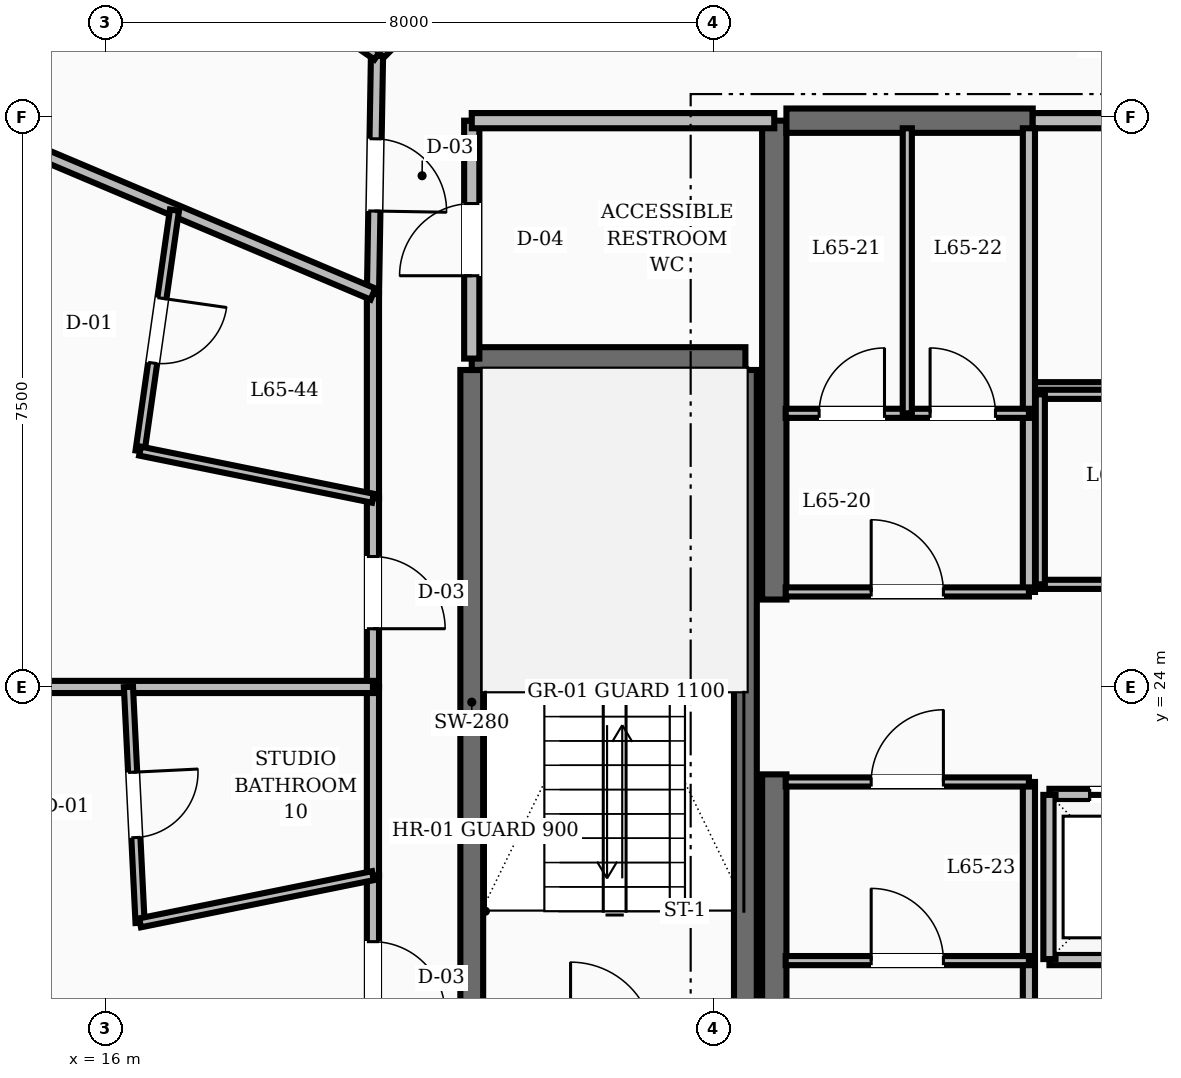
"""IFC4 building model, lengths in metres.
Left out: names, types, materials, properties, quantities, classifications, styles, units other than length and angle.
Written with IfcOpenShell. Run it as: python <this file> out.ifc"""

import sys

from ifc_helpers import new_model, si_unit, direction, frame, frame_2d, origin, place, context, subcontext, project, spatial, rectangle, extrude, element, fill, save


model = new_model("IFC4")
c1 = context("Model", 3, precision=1e-05, world=origin(), true_north=direction((0.0, 1.0)))
c2 = subcontext(c1, "Body", "Model", "MODEL_VIEW")
j1 = project(units=[si_unit("LENGTHUNIT", "METRE"), si_unit("PLANEANGLEUNIT", "RADIAN")], contexts=[c1])
p1 = place(None, origin())
s1 = spatial("IfcSite", under=j1, at=p1, CompositionType="ELEMENT")
p2 = place(p1, origin())
s2 = spatial("IfcBuilding", under=s1, at=p2, CompositionType="ELEMENT")
p3 = place(p2, frame((0.0, 0.0, 250.8)))
s3 = spatial("IfcBuildingStorey", under=s2, at=p3, CompositionType="ELEMENT", Elevation=250.8)
for number, where, z_axis, x_axis in (
    (1, (24.8, 16.55, 0.0), (0.0, 0.0, 1.0), (0.0, 1.0, 0.0)),
    (2, (24.8, 25.15, 0.0), (0.0, 0.0, 1.0), (0.0, 1.0, 0.0)),
):
    element("IfcWall", number, at=place(p3, frame(where, z_axis=z_axis, x_axis=x_axis)), inside=s3, PredefinedType="SHEAR", context=c2, shape_type="SweptSolid", body=[
        extrude(rectangle(XDim=6.3, YDim=0.32, at=frame_2d((3.15, 0.0))), origin(), (0.0, 0.0, 1.0), 3.6),
    ])
p4 = place(p3, frame((24.96, 31.45, 0.0), z_axis=(0.0, 0.0, 1.0), x_axis=(1.0, 0.0, 0.0)))
e3 = element("IfcWall", 3, at=p4, inside=s3, PredefinedType="SHEAR", context=c2, shape_type="SweptSolid", body=[
    extrude(rectangle(XDim=3.24, YDim=0.32, at=frame_2d((1.62, 0.0))), origin(), (0.0, 0.0, 1.0), 3.6),
])
for number, where, z_axis, x_axis in (
    (4, (20.82, 19.43, 0.0), (0.0, 0.0, 1.0), (0.0, 1.0, 0.0)),
    (5, (24.42, 19.43, 0.0), (0.0, 0.0, 1.0), (0.0, 1.0, 0.0)),
):
    element("IfcWall", number, at=place(p3, frame(where, z_axis=z_axis, x_axis=x_axis)), inside=s3, PredefinedType="SHEAR", context=c2, shape_type="SweptSolid", body=[
        extrude(rectangle(XDim=8.74, YDim=0.3, at=frame_2d((4.37, 0.0))), origin(), (0.0, 0.0, 1.0), 3.6),
    ])
p5 = place(p3, frame((20.82, 28.32, 0.0), z_axis=(0.0, 0.0, 1.0), x_axis=(1.0, 0.0, 0.0)))
e6 = element("IfcWall", 6, at=p5, inside=s3, PredefinedType="SHEAR", context=c2, shape_type="SweptSolid", body=[
    extrude(rectangle(XDim=3.6, YDim=0.3, at=frame_2d((1.8, 0.0))), origin(), (0.0, 0.0, 1.0), 3.6),
])
p6 = place(p3, frame((20.82, 28.32, 0.0), z_axis=(0.0, 0.0, 1.0), x_axis=(0.0, 1.0, 0.0)))
e7 = element("IfcWall", 7, at=p6, inside=s3, PredefinedType="SOLIDWALL", context=c2, shape_type="SweptSolid", body=[
    extrude(rectangle(XDim=3.13, YDim=0.2, at=frame_2d((1.565, 0.0))), origin(), (0.0, 0.0, 1.0), 2.87),
])
p7 = place(p6, frame((1.09, 0.0, 0.0)))
e8 = element("IfcOpeningElement", 8, at=p7, cuts=e7, PredefinedType="OPENING", context=c2, shape_type="SweptSolid", body=[
    extrude(rectangle(XDim=0.95, YDim=2.1, at=frame_2d((0.475, 1.05))), frame((0.0, 0.11, 0.0), z_axis=(0.0, -1.0, 0.0), x_axis=(1.0, 0.0, 0.0)), (0.0, 0.0, 1.0), 0.22),
])
p8 = place(p3, frame((20.82, 31.45, 0.0), z_axis=(0.0, 0.0, 1.0), x_axis=(1.0, 0.0, 0.0)))
e9 = element("IfcWall", 9, at=p8, inside=s3, PredefinedType="SOLIDWALL", context=c2, shape_type="SweptSolid", body=[
    extrude(rectangle(XDim=3.98, YDim=0.2, at=frame_2d((1.99, 0.0))), origin(), (0.0, 0.0, 1.0), 2.87),
])
p9 = place(p3, frame((28.42, 22.58, 0.0), z_axis=(0.0, 0.0, 1.0), x_axis=(1.0, 0.0, 0.0)))
e10 = element("IfcWall", 10, at=p9, inside=s3, PredefinedType="SOLIDWALL", context=c2, shape_type="SweptSolid", body=[
    extrude(rectangle(XDim=2.16, YDim=0.16, at=frame_2d((1.08, 0.0))), origin(), (0.0, 0.0, 1.0), 2.87),
])
p10 = place(p9, frame((0.53, 0.0, 0.0)))
e11 = element("IfcOpeningElement", 11, at=p10, cuts=e10, PredefinedType="OPENING", context=c2, shape_type="SweptSolid", body=[
    extrude(rectangle(XDim=1.1, YDim=2.15, at=frame_2d((0.55, 1.075))), frame((0.0, 0.09, 0.0), z_axis=(0.0, -1.0, 0.0), x_axis=(1.0, 0.0, 0.0)), (0.0, 0.0, 1.0), 0.18),
])
for number, where, z_axis, x_axis in (
    (12, (28.42, 20.42, 0.0), (0.0, 0.0, 1.0), (1.0, 0.0, 0.0)),
    (13, (28.42, 20.42, 0.0), (0.0, 0.0, 1.0), (0.0, 1.0, 0.0)),
):
    element("IfcWall", number, at=place(p3, frame(where, z_axis=z_axis, x_axis=x_axis)), inside=s3, PredefinedType="SOLIDWALL", context=c2, shape_type="SweptSolid", body=[
        extrude(rectangle(XDim=2.16, YDim=0.16, at=frame_2d((1.08, 0.0))), origin(), (0.0, 0.0, 1.0), 2.87),
    ])
p11 = place(p3, frame((28.2, 31.45, 0.0), z_axis=(0.0, 0.0, 1.0), x_axis=(1.0, 0.0, 0.0)))
e14 = element("IfcWall", 14, at=p11, inside=s3, PredefinedType="SOLIDWALL", context=c2, shape_type="SweptSolid", body=[
    extrude(rectangle(XDim=7.6, YDim=0.2, at=frame_2d((3.8, 0.0))), origin(), (0.0, 0.0, 1.0), 2.87),
])
p12 = place(p11, frame((1.0, 0.0, 0.0)))
e15 = element("IfcOpeningElement", 15, at=p12, cuts=e14, PredefinedType="OPENING", context=c2, shape_type="SweptSolid", body=[
    extrude(rectangle(XDim=0.95, YDim=2.1, at=frame_2d((0.475, 1.05))), frame((0.0, 0.11, 0.0), z_axis=(0.0, -1.0, 0.0), x_axis=(1.0, 0.0, 0.0)), (0.0, 0.0, 1.0), 0.22),
])
p13 = place(p3, frame((28.2, 27.95, 0.0), z_axis=(0.0, 0.0, 1.0), x_axis=(1.0, 0.0, 0.0)))
e16 = element("IfcWall", 16, at=p13, inside=s3, PredefinedType="PARTITIONING", context=c2, shape_type="SweptSolid", body=[
    extrude(rectangle(XDim=7.6, YDim=0.12, at=frame_2d((3.8, 0.0))), origin(), (0.0, 0.0, 1.0), 2.87),
])
p14 = place(p3, frame((28.3, 25.35, 0.0), z_axis=(0.0, 0.0, 1.0), x_axis=(1.0, 0.0, 0.0)))
e17 = element("IfcWall", 17, at=p14, inside=s3, PredefinedType="PARTITIONING", context=c2, shape_type="SweptSolid", body=[
    extrude(rectangle(XDim=4.95, YDim=0.12, at=frame_2d((2.475, 0.0))), origin(), (0.0, 0.0, 1.0), 2.87),
])
p15 = place(p14, frame((2.0, 0.0, 0.0)))
e18 = element("IfcOpeningElement", 18, at=p15, cuts=e17, PredefinedType="OPENING", context=c2, shape_type="SweptSolid", body=[
    extrude(rectangle(XDim=0.95, YDim=2.1, at=frame_2d((0.475, 1.05))), frame((0.0, 0.07, 0.0), z_axis=(0.0, -1.0, 0.0), x_axis=(1.0, 0.0, 0.0)), (0.0, 0.0, 1.0), 0.14),
])
p16 = place(p3, frame((28.3, 27.85, 0.0), z_axis=(0.0, 0.0, 1.0), x_axis=(1.0, 0.0, 0.0)))
e19 = element("IfcWall", 19, at=p16, inside=s3, PredefinedType="PARTITIONING", context=c2, shape_type="SweptSolid", body=[
    extrude(rectangle(XDim=4.95, YDim=0.12, at=frame_2d((2.475, 0.0))), origin(), (0.0, 0.0, 1.0), 2.87),
])
p17 = place(p3, frame((28.3, 25.35, 0.0), z_axis=(0.0, 0.0, 1.0), x_axis=(0.0, 1.0, 0.0)))
e20 = element("IfcWall", 20, at=p17, inside=s3, PredefinedType="PARTITIONING", context=c2, shape_type="SweptSolid", body=[
    extrude(rectangle(XDim=2.5, YDim=0.12, at=frame_2d((1.25, 0.0))), origin(), (0.0, 0.0, 1.0), 2.87),
])
p18 = place(p3, frame((28.15, 16.7, 0.0), z_axis=(0.0, 0.0, 1.0), x_axis=(0.0, 1.0, 0.0)))
e21 = element("IfcWall", 21, at=p18, inside=s3, PredefinedType="SOLIDWALL", context=c2, shape_type="SweptSolid", body=[
    extrude(rectangle(XDim=6.05, YDim=0.16, at=frame_2d((3.025, 0.0))), origin(), (0.0, 0.0, 1.0), 2.87),
])
p19 = place(p3, frame((28.15, 25.25, 0.0), z_axis=(0.0, 0.0, 1.0), x_axis=(0.0, 1.0, 0.0)))
e22 = element("IfcWall", 22, at=p19, inside=s3, PredefinedType="SOLIDWALL", context=c2, shape_type="SweptSolid", body=[
    extrude(rectangle(XDim=6.1, YDim=0.16, at=frame_2d((3.05, 0.0))), origin(), (0.0, 0.0, 1.0), 2.87),
])
p20 = place(p3, frame((24.95, 25.25, 0.0), z_axis=(0.0, 0.0, 1.0), x_axis=(1.0, 0.0, 0.0)))
e23 = element("IfcWall", 23, at=p20, inside=s3, PredefinedType="PARTITIONING", context=c2, shape_type="SweptSolid", body=[
    extrude(rectangle(XDim=3.2, YDim=0.12, at=frame_2d((1.6, 0.0))), origin(), (0.0, 0.0, 1.0), 2.87),
])
p21 = place(p20, frame((1.125, 0.0, 0.0)))
e24 = element("IfcOpeningElement", 24, at=p21, cuts=e23, PredefinedType="OPENING", context=c2, shape_type="SweptSolid", body=[
    extrude(rectangle(XDim=0.95, YDim=2.1, at=frame_2d((0.475, 1.05))), frame((0.0, 0.07, 0.0), z_axis=(0.0, -1.0, 0.0), x_axis=(1.0, 0.0, 0.0)), (0.0, 0.0, 1.0), 0.14),
])
p22 = place(p3, frame((24.95, 22.75, 0.0), z_axis=(0.0, 0.0, 1.0), x_axis=(1.0, 0.0, 0.0)))
e25 = element("IfcWall", 25, at=p22, inside=s3, PredefinedType="PARTITIONING", context=c2, shape_type="SweptSolid", body=[
    extrude(rectangle(XDim=3.2, YDim=0.12, at=frame_2d((1.6, 0.0))), origin(), (0.0, 0.0, 1.0), 2.87),
])
p23 = place(p22, frame((1.125, 0.0, 0.0)))
e26 = element("IfcOpeningElement", 26, at=p23, cuts=e25, PredefinedType="OPENING", context=c2, shape_type="SweptSolid", body=[
    extrude(rectangle(XDim=0.95, YDim=2.1, at=frame_2d((0.475, 1.05))), frame((0.0, 0.07, 0.0), z_axis=(0.0, -1.0, 0.0), x_axis=(1.0, 0.0, 0.0)), (0.0, 0.0, 1.0), 0.14),
])
p24 = place(p3, frame((24.95, 27.6, 0.0), z_axis=(0.0, 0.0, 1.0), x_axis=(1.0, 0.0, 0.0)))
e27 = element("IfcWall", 27, at=p24, inside=s3, PredefinedType="PARTITIONING", context=c2, shape_type="SweptSolid", body=[
    extrude(rectangle(XDim=3.2, YDim=0.12, at=frame_2d((1.6, 0.0))), origin(), (0.0, 0.0, 1.0), 2.87),
])
p25 = place(p24, frame((0.44, 0.0, 0.0)))
e28 = element("IfcOpeningElement", 28, at=p25, cuts=e27, PredefinedType="OPENING", context=c2, shape_type="SweptSolid", body=[
    extrude(rectangle(XDim=0.86, YDim=2.1, at=frame_2d((0.43, 1.05))), frame((0.0, 0.07, 0.0), z_axis=(0.0, -1.0, 0.0), x_axis=(1.0, 0.0, 0.0)), (0.0, 0.0, 1.0), 0.14),
])
p26 = place(p24, frame((1.9, 0.0, 0.0)))
e29 = element("IfcOpeningElement", 29, at=p26, cuts=e27, PredefinedType="OPENING", context=c2, shape_type="SweptSolid", body=[
    extrude(rectangle(XDim=0.86, YDim=2.1, at=frame_2d((0.43, 1.05))), frame((0.0, 0.07, 0.0), z_axis=(0.0, -1.0, 0.0), x_axis=(1.0, 0.0, 0.0)), (0.0, 0.0, 1.0), 0.14),
])
p27 = place(p3, frame((26.55, 27.6, 0.0), z_axis=(0.0, 0.0, 1.0), x_axis=(0.0, 1.0, 0.0)))
e30 = element("IfcWall", 30, at=p27, inside=s3, PredefinedType="PARTITIONING", context=c2, shape_type="SweptSolid", body=[
    extrude(rectangle(XDim=3.75, YDim=0.12, at=frame_2d((1.875, 0.0))), origin(), (0.0, 0.0, 1.0), 2.87),
])
p28 = place(p3, frame((24.95, 20.4, 0.0), z_axis=(0.0, 0.0, 1.0), x_axis=(1.0, 0.0, 0.0)))
e31 = element("IfcWall", 31, at=p28, inside=s3, PredefinedType="PARTITIONING", context=c2, shape_type="SweptSolid", body=[
    extrude(rectangle(XDim=3.2, YDim=0.12, at=frame_2d((1.6, 0.0))), origin(), (0.0, 0.0, 1.0), 2.87),
])
p29 = place(p28, frame((1.125, 0.0, 0.0)))
e32 = element("IfcOpeningElement", 32, at=p29, cuts=e31, PredefinedType="OPENING", context=c2, shape_type="SweptSolid", body=[
    extrude(rectangle(XDim=0.95, YDim=2.1, at=frame_2d((0.475, 1.05))), frame((0.0, 0.07, 0.0), z_axis=(0.0, -1.0, 0.0), x_axis=(1.0, 0.0, 0.0)), (0.0, 0.0, 1.0), 0.14),
])
p30 = place(p3, frame((21.635, 34.365, 0.0), z_axis=(0.0, 0.0, 1.0), x_axis=(-0.707106781187, -0.707106781187, 0.0)))
e33 = element("IfcWall", 33, at=p30, inside=s3, PredefinedType="SOLIDWALL", context=c2, shape_type="SweptSolid", body=[
    extrude(rectangle(XDim=2.916, YDim=0.16, at=frame_2d((1.458, 0.0))), origin(), (0.0, 0.0, 1.0), 2.87),
])
p31 = place(p3, frame((19.573, 32.303, 0.0), z_axis=(0.0, 0.0, 1.0), x_axis=(-0.016981035134, -0.999855811828, 0.0)))
e34 = element("IfcWall", 34, at=p31, inside=s3, PredefinedType="SOLIDWALL", context=c2, shape_type="SweptSolid", body=[
    extrude(rectangle(XDim=3.134, YDim=0.16, at=frame_2d((1.567, 0.0))), origin(), (0.0, 0.0, 1.0), 2.87),
])
p32 = place(p31, frame((1.092, 0.0, 0.0)))
e35 = element("IfcOpeningElement", 35, at=p32, cuts=e34, PredefinedType="OPENING", context=c2, shape_type="SweptSolid", body=[
    extrude(rectangle(XDim=0.95, YDim=2.1, at=frame_2d((0.475, 1.05))), frame((0.0, 0.09, 0.0), z_axis=(0.0, -1.0, 0.0), x_axis=(1.0, 0.0, 0.0)), (0.0, 0.0, 1.0), 0.18),
])
p33 = place(p3, frame((19.52, 29.169, 0.0), z_axis=(0.0, 0.0, 1.0), x_axis=(0.0, -1.0, 0.0)))
e36 = element("IfcWall", 36, at=p33, inside=s3, PredefinedType="SOLIDWALL", context=c2, shape_type="SweptSolid", body=[
    extrude(rectangle(XDim=2.687, YDim=0.16, at=frame_2d((1.344, 0.0))), origin(), (0.0, 0.0, 1.0), 2.87),
])
p34 = place(p3, frame((19.52, 26.482, 0.0), z_axis=(0.0, 0.0, 1.0), x_axis=(0.0, -1.0, 0.0)))
e37 = element("IfcWall", 37, at=p34, inside=s3, PredefinedType="SOLIDWALL", context=c2, shape_type="SweptSolid", body=[
    extrude(rectangle(XDim=2.482, YDim=0.16, at=frame_2d((1.241, 0.0))), origin(), (0.0, 0.0, 1.0), 2.87),
])
p35 = place(p34, frame((0.766, 0.0, 0.0)))
e38 = element("IfcOpeningElement", 38, at=p35, cuts=e37, PredefinedType="OPENING", context=c2, shape_type="SweptSolid", body=[
    extrude(rectangle(XDim=0.95, YDim=2.1, at=frame_2d((0.475, 1.05))), frame((0.0, 0.09, 0.0), z_axis=(0.0, -1.0, 0.0), x_axis=(1.0, 0.0, 0.0)), (0.0, 0.0, 1.0), 0.18),
])
p36 = place(p3, frame((19.52, 24.0, 0.0), z_axis=(0.0, 0.0, 1.0), x_axis=(0.0, -1.0, 0.0)))
e39 = element("IfcWall", 39, at=p36, inside=s3, PredefinedType="SOLIDWALL", context=c2, shape_type="SweptSolid", body=[
    extrude(rectangle(XDim=2.482, YDim=0.16, at=frame_2d((1.241, 0.0))), origin(), (0.0, 0.0, 1.0), 2.87),
])
p37 = place(p3, frame((19.52, 21.518, 0.0), z_axis=(0.0, 0.0, 1.0), x_axis=(0.0, -1.0, 0.0)))
e40 = element("IfcWall", 40, at=p37, inside=s3, PredefinedType="SOLIDWALL", context=c2, shape_type="SweptSolid", body=[
    extrude(rectangle(XDim=2.687, YDim=0.16, at=frame_2d((1.344, 0.0))), origin(), (0.0, 0.0, 1.0), 2.87),
])
p38 = place(p37, frame((0.868, 0.0, 0.0)))
e41 = element("IfcOpeningElement", 41, at=p38, cuts=e40, PredefinedType="OPENING", context=c2, shape_type="SweptSolid", body=[
    extrude(rectangle(XDim=0.95, YDim=2.1, at=frame_2d((0.475, 1.05))), frame((0.0, 0.09, 0.0), z_axis=(0.0, -1.0, 0.0), x_axis=(1.0, 0.0, 0.0)), (0.0, 0.0, 1.0), 0.18),
])
p39 = place(p3, frame((19.573, 32.303, 0.0), z_axis=(0.0, 0.0, 1.0), x_axis=(-0.824955305645, 0.565197968581, 0.0)))
e42 = element("IfcWall", 42, at=p39, inside=s3, PredefinedType="PARTITIONING", context=c2, shape_type="SweptSolid", body=[
    extrude(rectangle(XDim=2.298, YDim=0.12, at=frame_2d((1.149, 0.0))), origin(), (0.0, 0.0, 1.0), 2.87),
])
p40 = place(p3, frame((19.52, 29.169, 0.0), z_axis=(0.0, 0.0, 1.0), x_axis=(-0.921093629339, 0.38934114346, 0.0)))
e43 = element("IfcWall", 43, at=p40, inside=s3, PredefinedType="SOLIDWALL", context=c2, shape_type="SweptSolid", body=[
    extrude(rectangle(XDim=7.409, YDim=0.16, at=frame_2d((3.705, 0.0))), origin(), (0.0, 0.0, 1.0), 2.87),
])
p41 = place(p3, frame((16.909, 30.273, 0.0), z_axis=(0.0, 0.0, 1.0), x_axis=(-0.141432030345, -0.98994796873, 0.0)))
e44 = element("IfcWall", 44, at=p41, inside=s3, PredefinedType="PARTITIONING", context=c2, shape_type="SweptSolid", body=[
    extrude(rectangle(XDim=3.202, YDim=0.12, at=frame_2d((1.601, 0.0))), origin(), (0.0, 0.0, 1.0), 2.87),
])
p42 = place(p41, frame((1.171, 0.0, 0.0)))
e45 = element("IfcOpeningElement", 45, at=p42, cuts=e44, PredefinedType="OPENING", context=c2, shape_type="SweptSolid", body=[
    extrude(rectangle(XDim=0.86, YDim=2.1, at=frame_2d((0.43, 1.05))), frame((0.0, 0.07, 0.0), z_axis=(0.0, -1.0, 0.0), x_axis=(1.0, 0.0, 0.0)), (0.0, 0.0, 1.0), 0.14),
])
p43 = place(p3, frame((19.52, 26.482, 0.0), z_axis=(0.0, 0.0, 1.0), x_axis=(-0.980094066387, 0.198533677325, 0.0)))
e46 = element("IfcWall", 46, at=p43, inside=s3, PredefinedType="PARTITIONING", context=c2, shape_type="SweptSolid", body=[
    extrude(rectangle(XDim=3.126, YDim=0.12, at=frame_2d((1.563, 0.0))), origin(), (0.0, 0.0, 1.0), 2.87),
])
p44 = place(p3, frame((19.52, 24.0, 0.0), z_axis=(0.0, 0.0, 1.0), x_axis=(-1.0, 0.0, 0.0)))
e47 = element("IfcWall", 47, at=p44, inside=s3, PredefinedType="SOLIDWALL", context=c2, shape_type="SweptSolid", body=[
    extrude(rectangle(XDim=8.415, YDim=0.16, at=frame_2d((4.208, 0.0))), origin(), (0.0, 0.0, 1.0), 2.87),
])
p45 = place(p3, frame((16.303, 24.0, 0.0), z_axis=(0.0, 0.0, 1.0), x_axis=(0.049271319057, -0.99878543097, 0.0)))
e48 = element("IfcWall", 48, at=p45, inside=s3, PredefinedType="PARTITIONING", context=c2, shape_type="SweptSolid", body=[
    extrude(rectangle(XDim=3.107, YDim=0.12, at=frame_2d((1.553, 0.0))), origin(), (0.0, 0.0, 1.0), 2.87),
])
p46 = place(p45, frame((1.124, 0.0, 0.0)))
e49 = element("IfcOpeningElement", 49, at=p46, cuts=e48, PredefinedType="OPENING", context=c2, shape_type="SweptSolid", body=[
    extrude(rectangle(XDim=0.86, YDim=2.1, at=frame_2d((0.43, 1.05))), frame((0.0, 0.07, 0.0), z_axis=(0.0, -1.0, 0.0), x_axis=(1.0, 0.0, 0.0)), (0.0, 0.0, 1.0), 0.14),
])
p47 = place(p3, frame((19.52, 21.518, 0.0), z_axis=(0.0, 0.0, 1.0), x_axis=(-0.980094066387, -0.198533677325, 0.0)))
e50 = element("IfcWall", 50, at=p47, inside=s3, PredefinedType="PARTITIONING", context=c2, shape_type="SweptSolid", body=[
    extrude(rectangle(XDim=3.126, YDim=0.12, at=frame_2d((1.563, 0.0))), origin(), (0.0, 0.0, 1.0), 2.87),
])
p48 = place(p7, origin())
e51 = element("IfcDoor", 51, at=p48, inside=s3, OperationType="SINGLE_SWING_LEFT", PredefinedType="DOOR", context=c2, shape_type="SweptSolid", body=[
    extrude(rectangle(XDim=0.95, YDim=2.1, at=frame_2d((0.475, 1.05))), frame((0.0, 0.025, 0.0), z_axis=(0.0, -1.0, 0.0), x_axis=(1.0, 0.0, 0.0)), (0.0, 0.0, 1.0), 0.05),
])
fill(e8, e51)
p49 = place(p10, origin())
e52 = element("IfcDoor", 52, at=p49, inside=s3, OperationType="SLIDING_TO_LEFT", PredefinedType="DOOR", context=c2, shape_type="SweptSolid", body=[
    extrude(rectangle(XDim=1.1, YDim=2.15, at=frame_2d((0.55, 1.075))), frame((0.0, 0.025, 0.0), z_axis=(0.0, -1.0, 0.0), x_axis=(1.0, 0.0, 0.0)), (0.0, 0.0, 1.0), 0.05),
])
fill(e11, e52)
p50 = place(p21, origin())
e53 = element("IfcDoor", 53, at=p50, inside=s3, OperationType="SINGLE_SWING_LEFT", PredefinedType="DOOR", context=c2, shape_type="SweptSolid", body=[
    extrude(rectangle(XDim=0.95, YDim=2.1, at=frame_2d((0.475, 1.05))), frame((0.0, 0.025, 0.0), z_axis=(0.0, -1.0, 0.0), x_axis=(1.0, 0.0, 0.0)), (0.0, 0.0, 1.0), 0.05),
])
fill(e24, e53)
p51 = place(p25, origin())
e54 = element("IfcDoor", 54, at=p51, inside=s3, OperationType="SINGLE_SWING_RIGHT", PredefinedType="DOOR", context=c2, shape_type="SweptSolid", body=[
    extrude(rectangle(XDim=0.86, YDim=2.1, at=frame_2d((0.43, 1.05))), frame((0.0, 0.025, 0.0), z_axis=(0.0, -1.0, 0.0), x_axis=(1.0, 0.0, 0.0)), (0.0, 0.0, 1.0), 0.05),
])
fill(e28, e54)
p52 = place(p26, origin())
e55 = element("IfcDoor", 55, at=p52, inside=s3, OperationType="SINGLE_SWING_LEFT", PredefinedType="DOOR", context=c2, shape_type="SweptSolid", body=[
    extrude(rectangle(XDim=0.86, YDim=2.1, at=frame_2d((0.43, 1.05))), frame((0.0, 0.025, 0.0), z_axis=(0.0, -1.0, 0.0), x_axis=(1.0, 0.0, 0.0)), (0.0, 0.0, 1.0), 0.05),
])
fill(e29, e55)
p53 = place(p23, origin())
e56 = element("IfcDoor", 56, at=p53, inside=s3, OperationType="SINGLE_SWING_RIGHT", PredefinedType="DOOR", context=c2, shape_type="SweptSolid", body=[
    extrude(rectangle(XDim=0.95, YDim=2.1, at=frame_2d((0.475, 1.05))), frame((0.0, 0.025, 0.0), z_axis=(0.0, -1.0, 0.0), x_axis=(1.0, 0.0, 0.0)), (0.0, 0.0, 1.0), 0.05),
])
fill(e26, e56)
p54 = place(p29, origin())
e57 = element("IfcDoor", 57, at=p54, inside=s3, OperationType="SINGLE_SWING_LEFT", PredefinedType="DOOR", context=c2, shape_type="SweptSolid", body=[
    extrude(rectangle(XDim=0.95, YDim=2.1, at=frame_2d((0.475, 1.05))), frame((0.0, 0.025, 0.0), z_axis=(0.0, -1.0, 0.0), x_axis=(1.0, 0.0, 0.0)), (0.0, 0.0, 1.0), 0.05),
])
fill(e32, e57)
p55 = place(p32, origin())
e58 = element("IfcDoor", 58, at=p55, inside=s3, OperationType="SINGLE_SWING_RIGHT", PredefinedType="DOOR", context=c2, shape_type="SweptSolid", body=[
    extrude(rectangle(XDim=0.95, YDim=2.1, at=frame_2d((0.475, 1.05))), frame((0.0, 0.025, 0.0), z_axis=(0.0, -1.0, 0.0), x_axis=(1.0, 0.0, 0.0)), (0.0, 0.0, 1.0), 0.05),
])
fill(e35, e58)
p56 = place(p42, origin())
e59 = element("IfcDoor", 59, at=p56, inside=s3, OperationType="SINGLE_SWING_LEFT", PredefinedType="DOOR", context=c2, shape_type="SweptSolid", body=[
    extrude(rectangle(XDim=0.86, YDim=2.1, at=frame_2d((0.43, 1.05))), frame((0.0, 0.025, 0.0), z_axis=(0.0, -1.0, 0.0), x_axis=(1.0, 0.0, 0.0)), (0.0, 0.0, 1.0), 0.05),
])
fill(e45, e59)
p57 = place(p35, origin())
e60 = element("IfcDoor", 60, at=p57, inside=s3, OperationType="SINGLE_SWING_RIGHT", PredefinedType="DOOR", context=c2, shape_type="SweptSolid", body=[
    extrude(rectangle(XDim=0.95, YDim=2.1, at=frame_2d((0.475, 1.05))), frame((0.0, 0.025, 0.0), z_axis=(0.0, -1.0, 0.0), x_axis=(1.0, 0.0, 0.0)), (0.0, 0.0, 1.0), 0.05),
])
fill(e38, e60)
p58 = place(p46, origin())
e61 = element("IfcDoor", 61, at=p58, inside=s3, OperationType="SINGLE_SWING_LEFT", PredefinedType="DOOR", context=c2, shape_type="SweptSolid", body=[
    extrude(rectangle(XDim=0.86, YDim=2.1, at=frame_2d((0.43, 1.05))), frame((0.0, 0.025, 0.0), z_axis=(0.0, -1.0, 0.0), x_axis=(1.0, 0.0, 0.0)), (0.0, 0.0, 1.0), 0.05),
])
fill(e49, e61)
p59 = place(p38, origin())
e62 = element("IfcDoor", 62, at=p59, inside=s3, OperationType="SINGLE_SWING_RIGHT", PredefinedType="DOOR", context=c2, shape_type="SweptSolid", body=[
    extrude(rectangle(XDim=0.95, YDim=2.1, at=frame_2d((0.475, 1.05))), frame((0.0, 0.025, 0.0), z_axis=(0.0, -1.0, 0.0), x_axis=(1.0, 0.0, 0.0)), (0.0, 0.0, 1.0), 0.05),
])
fill(e41, e62)
save(model, sys.argv[1])
